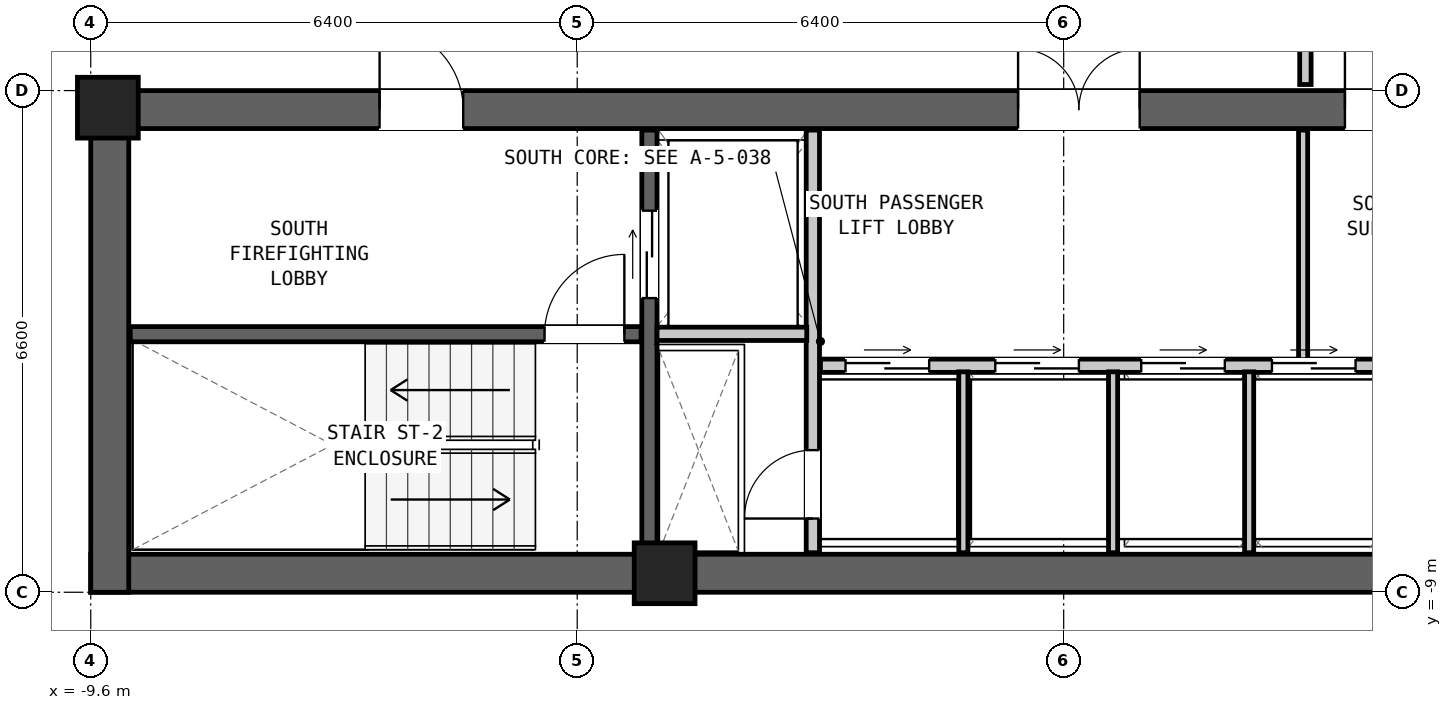
"""IFC4 building model, lengths in metres.
Left out: names, types, materials, properties, quantities, classifications, styles, units other than length and angle.
Written with IfcOpenShell. Run it as: python <this file> out.ifc"""

import sys

from ifc_helpers import new_model, si_unit, direction, frame, frame_2d, origin, origin_2d, place, context, subcontext, project, spatial, rectangle, extrude, element, fill, save


model = new_model("IFC4")
c1 = context("Model", 3, precision=1e-05, world=origin(), true_north=direction((0.0, 1.0)))
c2 = subcontext(c1, "Body", "Model", "MODEL_VIEW")
j1 = project(units=[si_unit("LENGTHUNIT", "METRE"), si_unit("PLANEANGLEUNIT", "RADIAN")], contexts=[c1])
p1 = place(None, origin())
s1 = spatial("IfcSite", under=j1, at=p1, CompositionType="ELEMENT")
p2 = place(p1, origin())
s2 = spatial("IfcBuilding", under=s1, at=p2, CompositionType="ELEMENT")
p3 = place(p2, frame((0.0, 0.0, 121.95)))
s3 = spatial("IfcBuildingStorey", under=s2, at=p3, CompositionType="ELEMENT", Elevation=121.95)
p4 = place(p3, frame((-9.6, -8.75, 0.0), z_axis=(0.0, 0.0, 1.0), x_axis=(1.0, 0.0, 0.0)))
e1 = element("IfcWall", 1, at=p4, inside=s3, PredefinedType="SHEAR", context=c2, shape_type="SweptSolid", body=[
    extrude(rectangle(XDim=19.2, YDim=0.5, at=frame_2d((9.6, 0.0))), origin(), (0.0, 0.0, 1.0), 3.05),
])
p5 = place(p3, frame((-9.6, -2.65, 0.0), z_axis=(0.0, 0.0, 1.0), x_axis=(1.0, 0.0, 0.0)))
e2 = element("IfcWall", 2, at=p5, inside=s3, PredefinedType="SHEAR", context=c2, shape_type="SweptSolid", body=[
    extrude(rectangle(XDim=19.2, YDim=0.5, at=frame_2d((9.6, 0.0))), origin(), (0.0, 0.0, 1.0), 3.05),
])
p6 = place(p5, frame((3.8, 0.0, 0.0)))
e3 = element("IfcOpeningElement", 3, at=p6, cuts=e2, PredefinedType="OPENING", context=c2, shape_type="SweptSolid", body=[
    extrude(rectangle(XDim=1.1, YDim=2.08, at=frame_2d((0.55, 1.04))), frame((0.0, 0.262, 0.0), z_axis=(0.0, -1.0, 0.0), x_axis=(1.0, 0.0, 0.0)), (0.0, 0.0, 1.0), 0.524),
])
p7 = place(p5, frame((12.2, 0.0, 0.0)))
e4 = element("IfcOpeningElement", 4, at=p7, cuts=e2, PredefinedType="OPENING", context=c2, shape_type="SweptSolid", body=[
    extrude(rectangle(XDim=1.6, YDim=2.12, at=frame_2d((0.8, 1.06))), frame((0.0, 0.262, 0.0), z_axis=(0.0, -1.0, 0.0), x_axis=(1.0, 0.0, 0.0)), (0.0, 0.0, 1.0), 0.524),
])
p8 = place(p5, frame((16.5, 0.0, 0.0)))
e5 = element("IfcOpeningElement", 5, at=p8, cuts=e2, PredefinedType="OPENING", context=c2, shape_type="SweptSolid", body=[
    extrude(rectangle(XDim=0.9, YDim=2.05, at=frame_2d((0.45, 1.025))), frame((0.0, 0.262, 0.0), z_axis=(0.0, -1.0, 0.0), x_axis=(1.0, 0.0, 0.0)), (0.0, 0.0, 1.0), 0.524),
])
p9 = place(p3, frame((-9.35, -9.0, 0.0), z_axis=(0.0, 0.0, 1.0), x_axis=(0.0, 1.0, 0.0)))
e6 = element("IfcWall", 6, at=p9, inside=s3, PredefinedType="SHEAR", context=c2, shape_type="SweptSolid", body=[
    extrude(rectangle(XDim=6.6, YDim=0.5, at=frame_2d((3.3, 0.0))), origin(), (0.0, 0.0, 1.0), 3.05),
])
for number, where, z_axis, x_axis in (
    (7, (-9.375, -2.625, 0.0), (0.0, 0.0, 1.0), (1.0, 0.0, 0.0)),
    (8, (-2.05, -8.75, 0.0), (0.0, 0.0, 1.0), (1.0, 0.0, 0.0)),
):
    element("IfcColumn", number, at=place(p3, frame(where, z_axis=z_axis, x_axis=x_axis)), inside=s3, PredefinedType="COLUMN", context=c2, shape_type="SweptSolid", body=[
        extrude(rectangle(XDim=0.8, YDim=0.8, at=origin_2d()), origin(), (0.0, 0.0, 1.0), 3.05),
    ])
p10 = place(p3, frame((-9.08, -5.605, 0.0), z_axis=(0.0, 0.0, 1.0), x_axis=(1.0, 0.0, 0.0)))
e9 = element("IfcWall", 9, at=p10, inside=s3, PredefinedType="SHEAR", context=c2, shape_type="SweptSolid", body=[
    extrude(rectangle(XDim=6.72, YDim=0.2, at=frame_2d((3.36, 0.0))), origin(), (0.0, 0.0, 1.0), 2.83),
])
p11 = place(p10, frame((5.45, 0.0, 0.0)))
e10 = element("IfcOpeningElement", 10, at=p11, cuts=e9, PredefinedType="OPENING", context=c2, shape_type="SweptSolid", body=[
    extrude(rectangle(XDim=1.05, YDim=2.08, at=frame_2d((0.525, 1.04))), frame((0.0, 0.112, 0.0), z_axis=(0.0, -1.0, 0.0), x_axis=(1.0, 0.0, 0.0)), (0.0, 0.0, 1.0), 0.224),
])
p12 = place(p3, frame((-2.25, -8.48, 0.0), z_axis=(0.0, 0.0, 1.0), x_axis=(0.0, 1.0, 0.0)))
e11 = element("IfcWall", 11, at=p12, inside=s3, PredefinedType="SHEAR", context=c2, shape_type="SweptSolid", body=[
    extrude(rectangle(XDim=5.56, YDim=0.2, at=frame_2d((2.78, 0.0))), origin(), (0.0, 0.0, 1.0), 2.83),
])
p13 = place(p12, frame((3.35, 0.0, 0.0)))
e12 = element("IfcOpeningElement", 12, at=p13, cuts=e11, PredefinedType="OPENING", context=c2, shape_type="SweptSolid", body=[
    extrude(rectangle(XDim=1.15, YDim=2.08, at=frame_2d((0.575, 1.04))), frame((0.0, 0.112, 0.0), z_axis=(0.0, -1.0, 0.0), x_axis=(1.0, 0.0, 0.0)), (0.0, 0.0, 1.0), 0.224),
])
p14 = place(p3, frame((-0.1, -8.48, 0.0), z_axis=(0.0, 0.0, 1.0), x_axis=(0.0, 1.0, 0.0)))
e13 = element("IfcWall", 13, at=p14, inside=s3, PredefinedType="PARTITIONING", context=c2, shape_type="SweptSolid", body=[
    extrude(rectangle(XDim=5.56, YDim=0.175, at=frame_2d((2.78, 0.0))), origin(), (0.0, 0.0, 1.0), 2.83),
])
p15 = place(p14, frame((0.45, 0.0, 0.0)))
e14 = element("IfcOpeningElement", 14, at=p15, cuts=e13, PredefinedType="OPENING", context=c2, shape_type="SweptSolid", body=[
    extrude(rectangle(XDim=0.9, YDim=2.05, at=frame_2d((0.45, 1.025))), frame((0.0, 0.1, 0.0), z_axis=(0.0, -1.0, 0.0), x_axis=(1.0, 0.0, 0.0)), (0.0, 0.0, 1.0), 0.199),
])
p16 = place(p3, frame((-2.15, -5.6, 0.0), z_axis=(0.0, 0.0, 1.0), x_axis=(1.0, 0.0, 0.0)))
e15 = element("IfcWall", 15, at=p16, inside=s3, PredefinedType="PARTITIONING", context=c2, shape_type="SweptSolid", body=[
    extrude(rectangle(XDim=1.97, YDim=0.175, at=frame_2d((0.985, 0.0))), origin(), (0.0, 0.0, 1.0), 2.83),
])
p17 = place(p3, frame((0.0, -6.02, 0.0), z_axis=(0.0, 0.0, 1.0), x_axis=(1.0, 0.0, 0.0)))
e16 = element("IfcWall", 16, at=p17, inside=s3, PredefinedType="PARTITIONING", context=c2, shape_type="SweptSolid", body=[
    extrude(rectangle(XDim=9.08, YDim=0.175, at=frame_2d((4.54, 0.0))), origin(), (0.0, 0.0, 1.0), 2.83),
])
p18 = place(p17, frame((0.33, 0.0, 0.0)))
e17 = element("IfcOpeningElement", 17, at=p18, cuts=e16, PredefinedType="OPENING", context=c2, shape_type="SweptSolid", body=[
    extrude(rectangle(XDim=1.1, YDim=2.06, at=frame_2d((0.55, 1.03))), frame((0.0, 0.1, 0.0), z_axis=(0.0, -1.0, 0.0), x_axis=(1.0, 0.0, 0.0)), (0.0, 0.0, 1.0), 0.199),
])
p19 = place(p17, frame((2.3, 0.0, 0.0)))
e18 = element("IfcOpeningElement", 18, at=p19, cuts=e16, PredefinedType="OPENING", context=c2, shape_type="SweptSolid", body=[
    extrude(rectangle(XDim=1.1, YDim=2.06, at=frame_2d((0.55, 1.03))), frame((0.0, 0.1, 0.0), z_axis=(0.0, -1.0, 0.0), x_axis=(1.0, 0.0, 0.0)), (0.0, 0.0, 1.0), 0.199),
])
p20 = place(p17, frame((4.22, 0.0, 0.0)))
e19 = element("IfcOpeningElement", 19, at=p20, cuts=e16, PredefinedType="OPENING", context=c2, shape_type="SweptSolid", body=[
    extrude(rectangle(XDim=1.1, YDim=2.06, at=frame_2d((0.55, 1.03))), frame((0.0, 0.1, 0.0), z_axis=(0.0, -1.0, 0.0), x_axis=(1.0, 0.0, 0.0)), (0.0, 0.0, 1.0), 0.199),
])
p21 = place(p17, frame((5.94, 0.0, 0.0)))
e20 = element("IfcOpeningElement", 20, at=p21, cuts=e16, PredefinedType="OPENING", context=c2, shape_type="SweptSolid", body=[
    extrude(rectangle(XDim=1.1, YDim=2.06, at=frame_2d((0.55, 1.03))), frame((0.0, 0.1, 0.0), z_axis=(0.0, -1.0, 0.0), x_axis=(1.0, 0.0, 0.0)), (0.0, 0.0, 1.0), 0.199),
])
p22 = place(p17, frame((7.66, 0.0, 0.0)))
e21 = element("IfcOpeningElement", 21, at=p22, cuts=e16, PredefinedType="OPENING", context=c2, shape_type="SweptSolid", body=[
    extrude(rectangle(XDim=1.1, YDim=2.06, at=frame_2d((0.55, 1.03))), frame((0.0, 0.1, 0.0), z_axis=(0.0, -1.0, 0.0), x_axis=(1.0, 0.0, 0.0)), (0.0, 0.0, 1.0), 0.199),
])
for number, where, z_axis, x_axis in (
    (22, (1.88, -8.48, 0.0), (0.0, 0.0, 1.0), (0.0, 1.0, 0.0)),
    (23, (3.85, -8.48, 0.0), (0.0, 0.0, 1.0), (0.0, 1.0, 0.0)),
    (24, (5.64, -8.48, 0.0), (0.0, 0.0, 1.0), (0.0, 1.0, 0.0)),
):
    element("IfcWall", number, at=place(p3, frame(where, z_axis=z_axis, x_axis=x_axis)), inside=s3, PredefinedType="PARTITIONING", context=c2, shape_type="SweptSolid", body=[
        extrude(rectangle(XDim=2.38, YDim=0.12, at=frame_2d((1.19, 0.0))), origin(), (0.0, 0.0, 1.0), 2.83),
    ])
p23 = place(p3, frame((6.35, -5.94, 0.0), z_axis=(0.0, 0.0, 1.0), x_axis=(0.0, 1.0, 0.0)))
e25 = element("IfcWall", 25, at=p23, inside=s3, PredefinedType="PARTITIONING", context=c2, shape_type="SweptSolid", body=[
    extrude(rectangle(XDim=3.02, YDim=0.12, at=frame_2d((1.51, 0.0))), origin(), (0.0, 0.0, 1.0), 2.83),
])
p24 = place(p3, frame((6.38, -2.32, 0.0), z_axis=(0.0, 0.0, 1.0), x_axis=(0.0, 1.0, 0.0)))
e26 = element("IfcWall", 26, at=p24, inside=s3, PredefinedType="PARTITIONING", context=c2, shape_type="SweptSolid", body=[
    extrude(rectangle(XDim=5.84, YDim=0.15, at=frame_2d((2.92, 0.0))), origin(), (0.0, 0.0, 1.0), 2.198),
])
p25 = place(p11, origin())
e27 = element("IfcDoor", 27, at=p25, inside=s3, OperationType="SINGLE_SWING_RIGHT", PredefinedType="DOOR", context=c2, shape_type="SweptSolid", body=[
    extrude(rectangle(XDim=1.05, YDim=2.08, at=frame_2d((0.525, 1.04))), frame((0.0, 0.025, 0.0), z_axis=(0.0, -1.0, 0.0), x_axis=(1.0, 0.0, 0.0)), (0.0, 0.0, 1.0), 0.05),
])
fill(e10, e27)
p26 = place(p6, origin())
e28 = element("IfcDoor", 28, at=p26, inside=s3, OperationType="SINGLE_SWING_LEFT", PredefinedType="DOOR", context=c2, shape_type="SweptSolid", body=[
    extrude(rectangle(XDim=1.1, YDim=2.08, at=frame_2d((0.55, 1.04))), frame((0.0, 0.025, 0.0), z_axis=(0.0, -1.0, 0.0), x_axis=(1.0, 0.0, 0.0)), (0.0, 0.0, 1.0), 0.05),
])
fill(e3, e28)
p27 = place(p13, origin())
e29 = element("IfcDoor", 29, at=p27, inside=s3, OperationType="DOUBLE_DOOR_SLIDING", PredefinedType="DOOR", context=c2, shape_type="SweptSolid", body=[
    extrude(rectangle(XDim=1.15, YDim=2.08, at=frame_2d((0.575, 1.04))), frame((0.0, 0.025, 0.0), z_axis=(0.0, -1.0, 0.0), x_axis=(1.0, 0.0, 0.0)), (0.0, 0.0, 1.0), 0.05),
])
fill(e12, e29)
p28 = place(p15, origin())
e30 = element("IfcDoor", 30, at=p28, inside=s3, OperationType="SINGLE_SWING_LEFT", PredefinedType="DOOR", context=c2, shape_type="SweptSolid", body=[
    extrude(rectangle(XDim=0.9, YDim=2.05, at=frame_2d((0.45, 1.025))), frame((0.0, 0.025, 0.0), z_axis=(0.0, -1.0, 0.0), x_axis=(1.0, 0.0, 0.0)), (0.0, 0.0, 1.0), 0.05),
])
fill(e14, e30)
p29 = place(p18, origin())
e31 = element("IfcDoor", 31, at=p29, inside=s3, OperationType="DOUBLE_DOOR_SLIDING", PredefinedType="DOOR", context=c2, shape_type="SweptSolid", body=[
    extrude(rectangle(XDim=1.1, YDim=2.06, at=frame_2d((0.55, 1.03))), frame((0.0, 0.025, 0.0), z_axis=(0.0, -1.0, 0.0), x_axis=(1.0, 0.0, 0.0)), (0.0, 0.0, 1.0), 0.05),
])
fill(e17, e31)
p30 = place(p19, origin())
e32 = element("IfcDoor", 32, at=p30, inside=s3, OperationType="DOUBLE_DOOR_SLIDING", PredefinedType="DOOR", context=c2, shape_type="SweptSolid", body=[
    extrude(rectangle(XDim=1.1, YDim=2.06, at=frame_2d((0.55, 1.03))), frame((0.0, 0.025, 0.0), z_axis=(0.0, -1.0, 0.0), x_axis=(1.0, 0.0, 0.0)), (0.0, 0.0, 1.0), 0.05),
])
fill(e18, e32)
p31 = place(p7, origin())
e33 = element("IfcDoor", 33, at=p31, inside=s3, OperationType="DOUBLE_DOOR_SINGLE_SWING", PredefinedType="DOOR", context=c2, shape_type="SweptSolid", body=[
    extrude(rectangle(XDim=1.6, YDim=2.12, at=frame_2d((0.8, 1.06))), frame((0.0, 0.025, 0.0), z_axis=(0.0, -1.0, 0.0), x_axis=(1.0, 0.0, 0.0)), (0.0, 0.0, 1.0), 0.05),
])
fill(e4, e33)
p32 = place(p8, origin())
e34 = element("IfcDoor", 34, at=p32, inside=s3, OperationType="SINGLE_SWING_LEFT", PredefinedType="DOOR", context=c2, shape_type="SweptSolid", body=[
    extrude(rectangle(XDim=0.9, YDim=2.05, at=frame_2d((0.45, 1.025))), frame((0.0, 0.025, 0.0), z_axis=(0.0, -1.0, 0.0), x_axis=(1.0, 0.0, 0.0)), (0.0, 0.0, 1.0), 0.05),
])
fill(e5, e34)
p33 = place(p20, origin())
e35 = element("IfcDoor", 35, at=p33, inside=s3, OperationType="DOUBLE_DOOR_SLIDING", PredefinedType="DOOR", context=c2, shape_type="SweptSolid", body=[
    extrude(rectangle(XDim=1.1, YDim=2.06, at=frame_2d((0.55, 1.03))), frame((0.0, 0.025, 0.0), z_axis=(0.0, -1.0, 0.0), x_axis=(1.0, 0.0, 0.0)), (0.0, 0.0, 1.0), 0.05),
])
fill(e19, e35)
p34 = place(p21, origin())
e36 = element("IfcDoor", 36, at=p34, inside=s3, OperationType="DOUBLE_DOOR_SLIDING", PredefinedType="DOOR", context=c2, shape_type="SweptSolid", body=[
    extrude(rectangle(XDim=1.1, YDim=2.06, at=frame_2d((0.55, 1.03))), frame((0.0, 0.025, 0.0), z_axis=(0.0, -1.0, 0.0), x_axis=(1.0, 0.0, 0.0)), (0.0, 0.0, 1.0), 0.05),
])
fill(e20, e36)
save(model, sys.argv[1])
